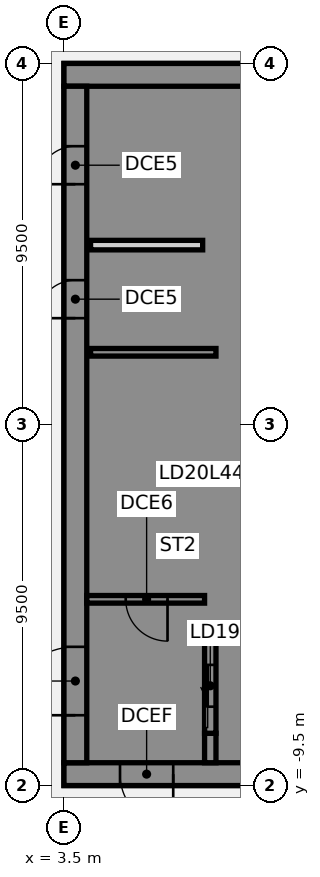
"""IFC4 building model, lengths in metres.
Left out: names, types, materials, properties, quantities, classifications, styles, units other than length and angle.
Written with IfcOpenShell. Run it as: python <this file> out.ifc"""

import sys

from ifc_helpers import new_model, si_unit, direction, frame, frame_2d, origin, place, context, subcontext, project, spatial, polyline, rectangle, outline, extrude, element, fill, save


model = new_model("IFC4")
c1 = context("Model", 3, precision=1e-05, world=origin(), true_north=direction((0.0, 1.0)))
c2 = subcontext(c1, "Body", "Model", "MODEL_VIEW")
j1 = project(units=[si_unit("LENGTHUNIT", "METRE"), si_unit("PLANEANGLEUNIT", "RADIAN")], contexts=[c1])
p1 = place(None, origin())
s1 = spatial("IfcSite", under=j1, at=p1, CompositionType="ELEMENT")
p2 = place(p1, origin())
s2 = spatial("IfcBuilding", under=s1, at=p2, CompositionType="ELEMENT")
p3 = place(p2, frame((0.0, 0.0, 178.0)))
s3 = spatial("IfcBuildingStorey", under=s2, at=p3, CompositionType="ELEMENT", Elevation=178.0)
p4 = place(p3, frame((16.5, -9.2, 0.0), z_axis=(0.0, 0.0, 1.0), x_axis=(-1.0, 0.0, 0.0)))
e1 = element("IfcWall", 1, at=p4, inside=s3, PredefinedType="SHEAR", context=c2, shape_type="SweptSolid", body=[
    extrude(rectangle(XDim=13.0, YDim=0.6, at=frame_2d((6.5, 0.0))), origin(), (0.0, 0.0, 1.0), 4.36),
])
p5 = place(p4, frame((4.15, 0.0, 0.0)))
e2 = element("IfcOpeningElement", 2, at=p5, cuts=e1, PredefinedType="OPENING", context=c2, shape_type="SweptSolid", body=[
    extrude(rectangle(XDim=1.4, YDim=2.1, at=frame_2d((0.7, 1.05))), frame((0.0, 0.31, 0.0), z_axis=(0.0, -1.0, 0.0), x_axis=(1.0, 0.0, 0.0)), (0.0, 0.0, 1.0), 0.62),
])
p6 = place(p4, frame((10.125, 0.0, 0.0)))
e3 = element("IfcOpeningElement", 3, at=p6, cuts=e1, PredefinedType="OPENING", context=c2, shape_type="SweptSolid", body=[
    extrude(rectangle(XDim=1.4, YDim=2.1, at=frame_2d((0.7, 1.05))), frame((0.0, 0.31, 0.0), z_axis=(0.0, -1.0, 0.0), x_axis=(1.0, 0.0, 0.0)), (0.0, 0.0, 1.0), 0.62),
])
p7 = place(p3, frame((16.5, 9.2, 0.0), z_axis=(0.0, 0.0, 1.0), x_axis=(-1.0, 0.0, 0.0)))
e4 = element("IfcWall", 4, at=p7, inside=s3, PredefinedType="SHEAR", context=c2, shape_type="SweptSolid", body=[
    extrude(rectangle(XDim=13.0, YDim=0.6, at=frame_2d((6.5, 0.0))), origin(), (0.0, 0.0, 1.0), 4.36),
])
p8 = place(p7, frame((4.15, 0.0, 0.0)))
e5 = element("IfcOpeningElement", 5, at=p8, cuts=e4, PredefinedType="OPENING", context=c2, shape_type="SweptSolid", body=[
    extrude(rectangle(XDim=1.4, YDim=2.1, at=frame_2d((0.7, 1.05))), frame((0.0, 0.31, 0.0), z_axis=(0.0, -1.0, 0.0), x_axis=(1.0, 0.0, 0.0)), (0.0, 0.0, 1.0), 0.62),
])
p9 = place(p3, origin())
e6 = element("IfcWall", 6, at=p9, inside=s3, PredefinedType="SHEAR", context=c2, shape_type="SweptSolid", body=[
    extrude(outline(polyline([(9.8, -5.375), (7.5, -5.375), (7.5, -2.875), (9.8, -2.875), (9.8, -2.625), (7.5, -2.625), (7.5, -0.125), (9.8, -0.125), (9.8, 0.125), (7.5, 0.125), (7.5, 2.625), (9.8, 2.625), (9.8, 2.875), (7.5, 2.875), (7.5, 5.375), (9.8, 5.375), (9.8, 5.625), (7.5, 5.625), (7.5, 8.125), (9.8, 8.125), (9.8, 8.9), (7.5, 8.9), (7.2, 8.9), (7.2, -5.625), (7.5, -5.625), (9.8, -5.625), (9.8, -5.375)])), origin(), (0.0, 0.0, 1.0), 4.36),
])
p10 = place(p3, origin())
e7 = element("IfcWall", 7, at=p10, inside=s3, PredefinedType="SHEAR", context=c2, shape_type="SweptSolid", body=[
    extrude(outline(polyline([(7.5, -8.125), (7.5, -8.9), (9.8, -8.9), (9.8, -8.125), (9.8, -5.625), (9.55, -5.625), (9.55, -8.125), (7.5, -8.125)])), origin(), (0.0, 0.0, 1.0), 4.36),
])
p11 = place(p3, frame((7.35, -8.9, 0.0), z_axis=(0.0, 0.0, 1.0), x_axis=(0.0, 1.0, 0.0)))
e8 = element("IfcWall", 8, at=p11, inside=s3, PredefinedType="SHEAR", context=c2, shape_type="SweptSolid", body=[
    extrude(rectangle(XDim=0.775, YDim=0.3, at=frame_2d((0.387, 0.0))), origin(), (0.0, 0.0, 1.0), 4.36),
])
p12 = place(p3, frame((7.5, 1.9, 0.0), z_axis=(0.0, 0.0, 1.0), x_axis=(-1.0, 0.0, 0.0)))
e9 = element("IfcWall", 9, at=p12, inside=s3, PredefinedType="SHEAR", context=c2, shape_type="SweptSolid", body=[
    extrude(rectangle(XDim=3.3, YDim=0.2, at=frame_2d((1.65, 0.0))), origin(), (0.0, 0.0, 1.0), 4.36),
])
p13 = place(p3, frame((7.35, -8.125, 0.0), z_axis=(0.0, 0.0, 1.0), x_axis=(0.0, 1.0, 0.0)))
e10 = element("IfcWall", 10, at=p13, inside=s3, PredefinedType="SHEAR", context=c2, shape_type="SweptSolid", body=[
    extrude(rectangle(XDim=2.5, YDim=0.3, at=frame_2d((1.25, 0.0))), origin(), (0.0, 0.0, 1.0), 4.36),
])
p14 = place(p13, frame((0.7, 0.0, 0.0)))
e11 = element("IfcOpeningElement", 11, at=p14, cuts=e10, PredefinedType="OPENING", context=c2, shape_type="SweptSolid", body=[
    extrude(rectangle(XDim=1.1, YDim=2.1, at=frame_2d((0.55, 1.05))), frame((0.0, 0.16, 0.0), z_axis=(0.0, -1.0, 0.0), x_axis=(1.0, 0.0, 0.0)), (0.0, 0.0, 1.0), 0.32),
])
p15 = place(p3, frame((3.8, -8.9, 0.0), z_axis=(0.0, 0.0, 1.0), x_axis=(0.0, 1.0, 0.0)))
e12 = element("IfcWall", 12, at=p15, inside=s3, PredefinedType="SHEAR", context=c2, shape_type="SweptSolid", body=[
    extrude(rectangle(XDim=17.8, YDim=0.6, at=frame_2d((8.9, 0.0))), origin(), (0.0, 0.0, 1.0), 4.36),
])
p16 = place(p15, frame((1.25, 0.0, 0.0)))
e13 = element("IfcOpeningElement", 13, at=p16, cuts=e12, PredefinedType="OPENING", context=c2, shape_type="SweptSolid", body=[
    extrude(rectangle(XDim=1.8, YDim=2.1, at=frame_2d((0.9, 1.05))), frame((0.0, 0.31, 0.0), z_axis=(0.0, -1.0, 0.0), x_axis=(1.0, 0.0, 0.0)), (0.0, 0.0, 1.0), 0.62),
])
p17 = place(p15, frame((11.698, 0.0, 0.0)))
e14 = element("IfcOpeningElement", 14, at=p17, cuts=e12, PredefinedType="OPENING", context=c2, shape_type="SweptSolid", body=[
    extrude(rectangle(XDim=1.0, YDim=2.1, at=frame_2d((0.5, 1.05))), frame((0.0, 0.31, 0.0), z_axis=(0.0, -1.0, 0.0), x_axis=(1.0, 0.0, 0.0)), (0.0, 0.0, 1.0), 0.62),
])
p18 = place(p15, frame((15.222, 0.0, 0.0)))
e15 = element("IfcOpeningElement", 15, at=p18, cuts=e12, PredefinedType="OPENING", context=c2, shape_type="SweptSolid", body=[
    extrude(rectangle(XDim=1.0, YDim=2.1, at=frame_2d((0.5, 1.05))), frame((0.0, 0.31, 0.0), z_axis=(0.0, -1.0, 0.0), x_axis=(1.0, 0.0, 0.0)), (0.0, 0.0, 1.0), 0.62),
])
p19 = place(p3, frame((7.15, 4.72, 0.0), z_axis=(0.0, 0.0, 1.0), x_axis=(-1.0, 0.0, 0.0)))
e16 = element("IfcWall", 16, at=p19, inside=s3, PredefinedType="PARTITIONING", context=c2, shape_type="SweptSolid", body=[
    extrude(rectangle(XDim=2.95, YDim=0.25, at=frame_2d((1.475, 0.0))), origin(), (0.0, 0.0, 1.0), 4.36),
])
p20 = place(p3, frame((7.2, -4.6, 0.0), z_axis=(0.0, 0.0, 1.0), x_axis=(-1.0, 0.0, 0.0)))
e17 = element("IfcWall", 17, at=p20, inside=s3, PredefinedType="SHEAR", context=c2, shape_type="SweptSolid", body=[
    extrude(rectangle(XDim=3.1, YDim=0.2, at=frame_2d((1.55, 0.0))), origin(), (0.0, 0.0, 1.0), 4.36),
])
p21 = place(p20, frame((0.975, 0.0, 0.0)))
e18 = element("IfcOpeningElement", 18, at=p21, cuts=e17, PredefinedType="OPENING", context=c2, shape_type="SweptSolid", body=[
    extrude(rectangle(XDim=1.1, YDim=2.1, at=frame_2d((0.55, 1.05))), frame((0.0, 0.11, 0.0), z_axis=(0.0, -1.0, 0.0), x_axis=(1.0, 0.0, 0.0)), (0.0, 0.0, 1.0), 0.22),
])
p22 = place(p6, origin())
e19 = element("IfcDoor", 19, at=p22, inside=s3, OperationType="SINGLE_SWING_LEFT", PredefinedType="DOOR", context=c2, shape_type="SweptSolid", body=[
    extrude(rectangle(XDim=1.4, YDim=2.1, at=frame_2d((0.7, 1.05))), frame((0.0, 0.025, 0.0), z_axis=(0.0, -1.0, 0.0), x_axis=(1.0, 0.0, 0.0)), (0.0, 0.0, 1.0), 0.05),
])
fill(e3, e19)
p23 = place(p16, origin())
e20 = element("IfcDoor", 20, at=p23, inside=s3, OperationType="SINGLE_SWING_LEFT", PredefinedType="DOOR", context=c2, shape_type="SweptSolid", body=[
    extrude(rectangle(XDim=1.8, YDim=2.1, at=frame_2d((0.9, 1.05))), frame((0.0, 0.025, 0.0), z_axis=(0.0, -1.0, 0.0), x_axis=(1.0, 0.0, 0.0)), (0.0, 0.0, 1.0), 0.05),
])
fill(e13, e20)
p24 = place(p17, origin())
e21 = element("IfcDoor", 21, at=p24, inside=s3, OperationType="SINGLE_SWING_LEFT", PredefinedType="DOOR", context=c2, shape_type="SweptSolid", body=[
    extrude(rectangle(XDim=1.0, YDim=2.1, at=frame_2d((0.5, 1.05))), frame((0.0, -0.225, 0.0), z_axis=(0.0, -1.0, 0.0), x_axis=(1.0, 0.0, 0.0)), (0.0, 0.0, 1.0), 0.05),
])
fill(e14, e21)
p25 = place(p18, origin())
e22 = element("IfcDoor", 22, at=p25, inside=s3, OperationType="SINGLE_SWING_LEFT", PredefinedType="DOOR", context=c2, shape_type="SweptSolid", body=[
    extrude(rectangle(XDim=1.0, YDim=2.1, at=frame_2d((0.5, 1.05))), frame((0.0, -0.225, 0.0), z_axis=(0.0, -1.0, 0.0), x_axis=(1.0, 0.0, 0.0)), (0.0, 0.0, 1.0), 0.05),
])
fill(e15, e22)
p26 = place(p21, origin())
e23 = element("IfcDoor", 23, at=p26, inside=s3, OperationType="SINGLE_SWING_LEFT", PredefinedType="DOOR", context=c2, shape_type="SweptSolid", body=[
    extrude(rectangle(XDim=1.1, YDim=2.1, at=frame_2d((0.55, 1.05))), frame((0.0, 0.025, 0.0), z_axis=(0.0, -1.0, 0.0), x_axis=(1.0, 0.0, 0.0)), (0.0, 0.0, 1.0), 0.05),
])
fill(e18, e23)
p27 = place(p14, origin())
e24 = element("IfcDoor", 24, at=p27, inside=s3, OperationType="SLIDING_TO_LEFT", PredefinedType="DOOR", context=c2, shape_type="SweptSolid", body=[
    extrude(rectangle(XDim=1.1, YDim=2.1, at=frame_2d((0.55, 1.05))), frame((0.0, 0.025, 0.0), z_axis=(0.0, -1.0, 0.0), x_axis=(1.0, 0.0, 0.0)), (0.0, 0.0, 1.0), 0.05),
])
fill(e11, e24)
save(model, sys.argv[1])
